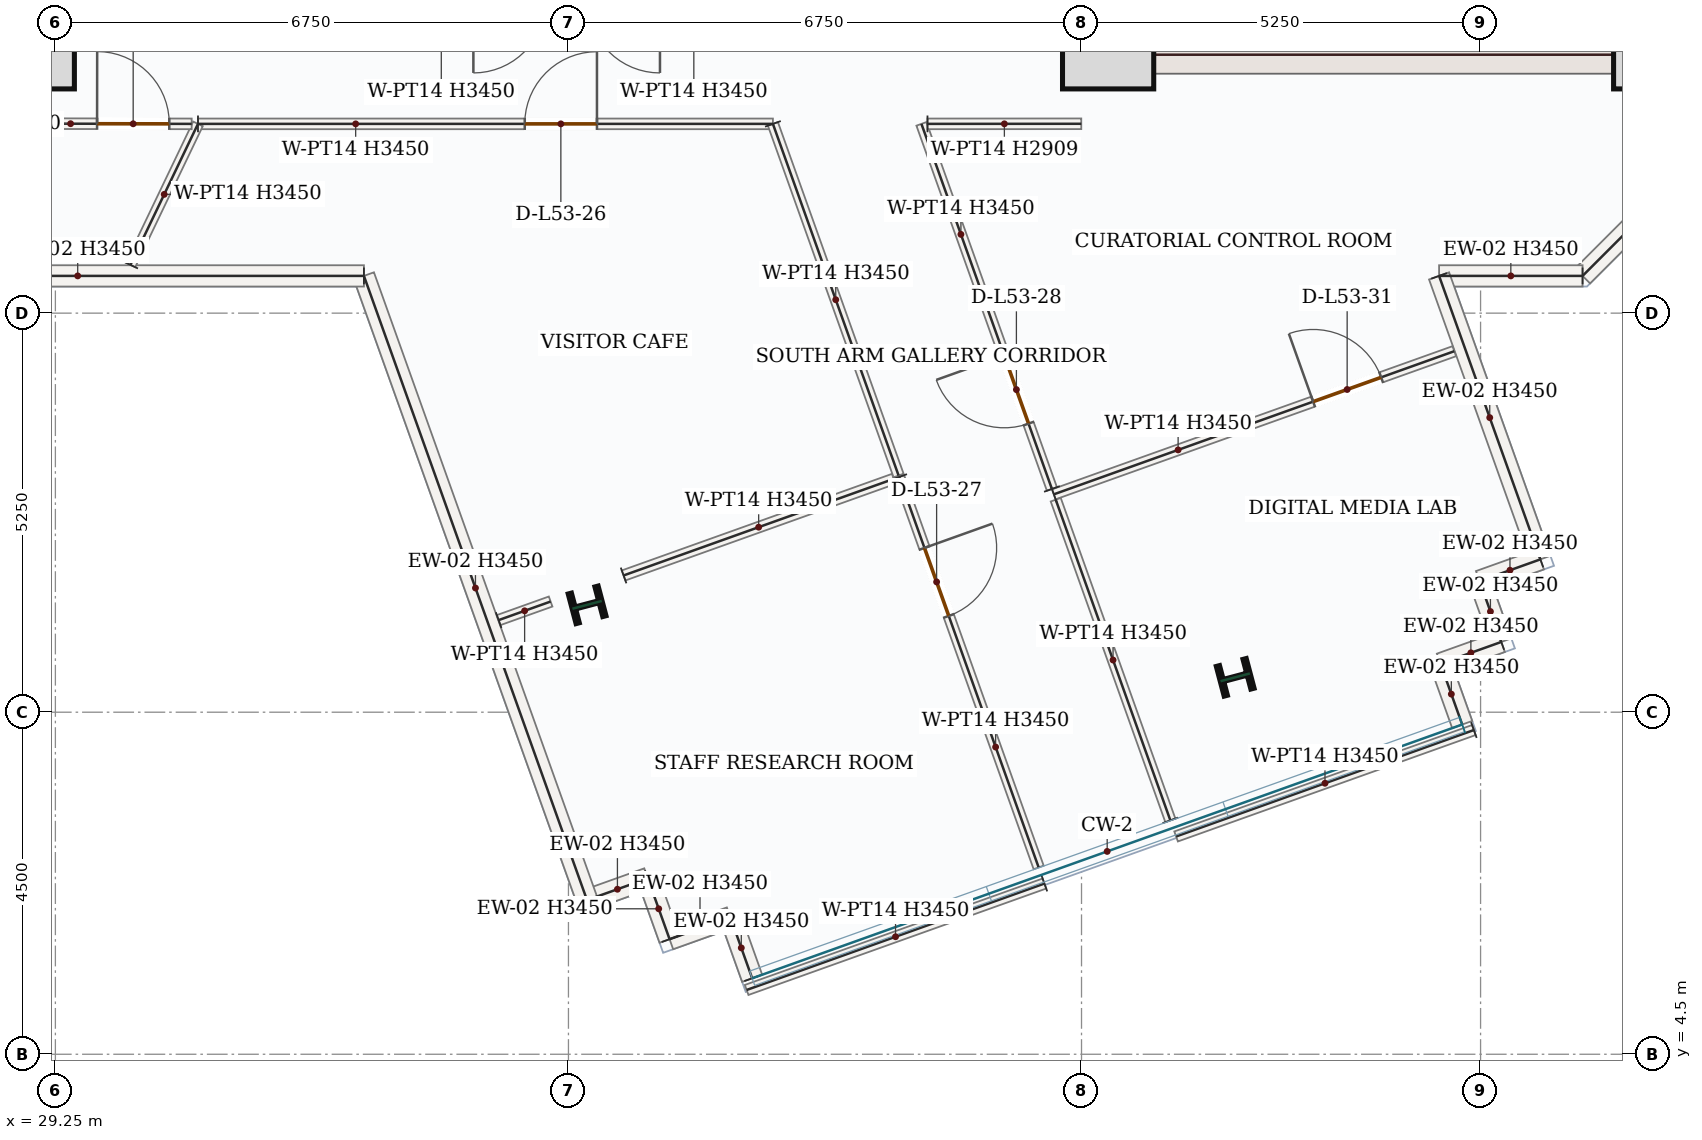
"""IFC4 building model, lengths in metres.
Left out: names, types, materials, properties, quantities, classifications, styles, units other than length and angle.
Written with IfcOpenShell. Run it as: python <this file> out.ifc"""

import sys

from ifc_helpers import new_model, si_unit, direction, frame, frame_2d, origin, origin_2d, place, context, subcontext, project, spatial, rectangle, i_section, extrude, source, transform, mapped, element, fill, save


model = new_model("IFC4")
c1 = context("Model", 3, precision=1e-05, world=origin(), true_north=direction((0.0, 1.0)))
c2 = subcontext(c1, "Body", "Model", "MODEL_VIEW")
j1 = project(units=[si_unit("LENGTHUNIT", "METRE"), si_unit("PLANEANGLEUNIT", "RADIAN")], contexts=[c1])
p1 = place(None, origin())
s1 = spatial("IfcSite", under=j1, at=p1, CompositionType="ELEMENT")
p2 = place(p1, origin())
s2 = spatial("IfcBuilding", under=s1, at=p2, CompositionType="ELEMENT")
p3 = place(p2, frame((0.0, 0.0, 225.3)))
s3 = spatial("IfcBuildingStorey", under=s2, at=p3, CompositionType="ELEMENT", Elevation=225.3)
p4 = place(p3, frame((29.0, 17.4, 0.0), z_axis=(0.0, 0.0, 1.0), x_axis=(0.0, 1.0, 0.0)))
e1 = element("IfcWall", 1, at=p4, inside=s3, PredefinedType="SHEAR", context=c2, shape_type="SweptSolid", body=[
    extrude(rectangle(XDim=8.55, YDim=0.5, at=frame_2d((4.275, 0.0))), origin(), (0.0, 0.0, 1.0), 3.45),
])
p5 = place(p4, frame((6.65, 0.0, 0.0)))
e2 = element("IfcOpeningElement", 2, at=p5, cuts=e1, PredefinedType="OPENING", context=c2, shape_type="SweptSolid", body=[
    extrude(rectangle(XDim=1.1, YDim=2.2, at=frame_2d((0.55, 1.1))), frame((0.0, 0.26, 0.0), z_axis=(0.0, -1.0, 0.0), x_axis=(1.0, 0.0, 0.0)), (0.0, 0.0, 1.0), 0.52),
])
p6 = place(p4, frame((2.15, 0.0, 0.0)))
e3 = element("IfcOpeningElement", 3, at=p6, cuts=e1, PredefinedType="OPENING", context=c2, shape_type="SweptSolid", body=[
    extrude(rectangle(XDim=0.88, YDim=2.1, at=frame_2d((0.44, 1.05))), frame((0.0, 0.26, 0.0), z_axis=(0.0, -1.0, 0.0), x_axis=(1.0, 0.0, 0.0)), (0.0, 0.0, 1.0), 0.52),
])
p7 = place(p4, frame((4.25, 0.0, 0.0)))
e4 = element("IfcOpeningElement", 4, at=p7, cuts=e1, PredefinedType="OPENING", context=c2, shape_type="SweptSolid", body=[
    extrude(rectangle(XDim=0.88, YDim=2.1, at=frame_2d((0.44, 1.05))), frame((0.0, 0.26, 0.0), z_axis=(0.0, -1.0, 0.0), x_axis=(1.0, 0.0, 0.0)), (0.0, 0.0, 1.0), 0.52),
])
p8 = place(p3, frame((43.0, 17.4, 0.0), z_axis=(0.0, 0.0, 1.0), x_axis=(0.0, 1.0, 0.0)))
e5 = element("IfcWall", 5, at=p8, inside=s3, PredefinedType="SHEAR", context=c2, shape_type="SweptSolid", body=[
    extrude(rectangle(XDim=8.55, YDim=0.5, at=frame_2d((4.275, 0.0))), origin(), (0.0, 0.0, 1.0), 3.45),
])
p9 = place(p8, frame((6.65, 0.0, 0.0)))
e6 = element("IfcOpeningElement", 6, at=p9, cuts=e5, PredefinedType="OPENING", context=c2, shape_type="SweptSolid", body=[
    extrude(rectangle(XDim=1.1, YDim=2.2, at=frame_2d((0.55, 1.1))), frame((0.0, 0.26, 0.0), z_axis=(0.0, -1.0, 0.0), x_axis=(1.0, 0.0, 0.0)), (0.0, 0.0, 1.0), 0.52),
])
p10 = place(p8, frame((1.75, 0.0, 0.0)))
e7 = element("IfcOpeningElement", 7, at=p10, cuts=e5, PredefinedType="OPENING", context=c2, shape_type="SweptSolid", body=[
    extrude(rectangle(XDim=1.3, YDim=2.2, at=frame_2d((0.65, 1.1))), frame((0.0, 0.26, 0.0), z_axis=(0.0, -1.0, 0.0), x_axis=(1.0, 0.0, 0.0)), (0.0, 0.0, 1.0), 0.52),
])
p11 = place(p8, frame((4.55, 0.0, 0.0)))
e8 = element("IfcOpeningElement", 8, at=p11, cuts=e5, PredefinedType="OPENING", context=c2, shape_type="SweptSolid", body=[
    extrude(rectangle(XDim=0.88, YDim=2.1, at=frame_2d((0.44, 1.05))), frame((0.0, 0.26, 0.0), z_axis=(0.0, -1.0, 0.0), x_axis=(1.0, 0.0, 0.0)), (0.0, 0.0, 1.0), 0.52),
])
m1 = source(origin(), c2, "Body", "SweptSolid", [
    extrude(rectangle(XDim=7.0, YDim=0.5, at=frame_2d((3.5, 0.0))), origin(), (0.0, 0.0, 1.0), 3.45),
])
p12 = place(p3, frame((43.25, 17.65, 0.0), z_axis=(0.0, 0.0, 1.0), x_axis=(1.0, 0.0, 0.0)))
e9 = element("IfcWall", 9, at=p12, inside=s3, PredefinedType="SHEAR", context=c2, shape_type="MappedRepresentation", body=[
    mapped(m1, transform((0.0, 0.0, 0.0), x_axis=(1.0, 0.0, 0.0), y_axis=(0.0, 1.0, 0.0), z_axis=(0.0, 0.0, 1.0), scale=1.0)),
])
m2 = source(origin(), c2, "Body", "SweptSolid", [
    extrude(rectangle(XDim=1.2, YDim=1.2, at=origin_2d()), origin(), (0.0, 0.0, 1.0), 3.9),
])
for number, where, z_axis, x_axis in (
    (10, (28.9, 17.8, 0.0), (0.0, 0.0, 1.0), (1.0, 0.0, 0.0)),
    (11, (43.1, 17.8, 0.0), (0.0, 0.0, 1.0), (1.0, 0.0, 0.0)),
    (12, (50.35, 17.8, 0.0), (0.0, 0.0, 1.0), (1.0, 0.0, 0.0)),
):
    element("IfcColumn", number, at=place(p3, frame(where, z_axis=z_axis, x_axis=x_axis)), inside=s3, PredefinedType="COLUMN", context=c2, shape_type="MappedRepresentation", body=[
        mapped(m2, transform((0.0, 0.0, 0.0), x_axis=(1.0, 0.0, 0.0), y_axis=(0.0, 1.0, 0.0), z_axis=(0.0, 0.0, 1.0), scale=1.0)),
    ])
m3 = source(origin(), c2, "Body", "SweptSolid", [
    extrude(i_section(OverallWidth=0.404, OverallDepth=0.407, WebThickness=0.027, FlangeThickness=0.044, FilletRadius=0.018, at=origin_2d()), origin(), (0.0, 0.0, 1.0), 3.9),
])
for number, where, z_axis, x_axis in (
    (13, (36.245, 10.412, 0.0), (0.0, 0.0, 1.0), (-0.255, 0.967, 0.0)),
    (14, (44.772, 9.459, 0.0), (0.0, 0.0, 1.0), (-0.255, 0.967, 0.0)),
):
    element("IfcColumn", number, at=place(p3, frame(where, z_axis=z_axis, x_axis=x_axis)), inside=s3, PredefinedType="COLUMN", context=c2, shape_type="MappedRepresentation", body=[
        mapped(m3, transform((0.0, 0.0, 0.0), x_axis=(1.0, 0.0, 0.0), y_axis=(0.0, 1.0, 0.0), z_axis=(0.0, 0.0, 1.0), scale=1.0)),
    ])
m4 = source(origin(), c2, "Body", "SweptSolid", [
    extrude(rectangle(XDim=5.258, YDim=0.28, at=frame_2d((2.629, 0.0))), origin(), (0.0, 0.0, 1.0), 3.45),
])
p13 = place(p3, frame((53.06, 18.458, 0.0), z_axis=(0.0, 0.0, 1.0), x_axis=(-0.707106781187, -0.707106781187, 0.0)))
e15 = element("IfcWall", 15, at=p13, inside=s3, PredefinedType="SOLIDWALL", context=c2, shape_type="MappedRepresentation", body=[
    mapped(m4, transform((0.0, 0.0, 0.0), x_axis=(1.0, 0.0, 0.0), y_axis=(0.0, 1.0, 0.0), z_axis=(0.0, 0.0, 1.0), scale=1.0)),
])
m5 = source(origin(), c2, "Body", "SweptSolid", [
    extrude(rectangle(XDim=1.888, YDim=0.28, at=frame_2d((0.944, 0.0))), origin(), (0.0, 0.0, 1.0), 3.45),
])
p14 = place(p3, frame((49.342, 14.74, 0.0), z_axis=(0.0, 0.0, 1.0), x_axis=(-1.0, 0.0, 0.0)))
e16 = element("IfcWall", 16, at=p14, inside=s3, PredefinedType="SOLIDWALL", context=c2, shape_type="MappedRepresentation", body=[
    mapped(m5, transform((0.0, 0.0, 0.0), x_axis=(1.0, 0.0, 0.0), y_axis=(0.0, 1.0, 0.0), z_axis=(0.0, 0.0, 1.0), scale=1.0)),
])
m6 = source(origin(), c2, "Body", "SweptSolid", [
    extrude(rectangle(XDim=3.96, YDim=0.28, at=frame_2d((1.98, 0.0))), origin(), (0.0, 0.0, 1.0), 3.45),
])
p15 = place(p3, frame((47.454, 14.74, 0.0), z_axis=(0.0, 0.0, 1.0), x_axis=(0.336590223561, -0.941651220677, 0.0)))
e17 = element("IfcWall", 17, at=p15, inside=s3, PredefinedType="SOLIDWALL", context=c2, shape_type="MappedRepresentation", body=[
    mapped(m6, transform((0.0, 0.0, 0.0), x_axis=(1.0, 0.0, 0.0), y_axis=(0.0, 1.0, 0.0), z_axis=(0.0, 0.0, 1.0), scale=1.0)),
])
m7 = source(origin(), c2, "Body", "SweptSolid", [
    extrude(rectangle(XDim=0.85, YDim=0.28, at=frame_2d((0.425, 0.0))), origin(), (0.0, 0.0, 1.0), 3.45),
])
p16 = place(p3, frame((48.787, 11.011, 0.0), z_axis=(0.0, 0.0, 1.0), x_axis=(-0.941657417713, -0.336572886112, 0.0)))
e18 = element("IfcWall", 18, at=p16, inside=s3, PredefinedType="SOLIDWALL", context=c2, shape_type="MappedRepresentation", body=[
    mapped(m7, transform((0.0, 0.0, 0.0), x_axis=(1.0, 0.0, 0.0), y_axis=(0.0, 1.0, 0.0), z_axis=(0.0, 0.0, 1.0), scale=1.0)),
])
m8 = source(origin(), c2, "Body", "SweptSolid", [
    extrude(rectangle(XDim=0.85, YDim=0.28, at=frame_2d((0.425, 0.0))), origin(), (0.0, 0.0, 1.0), 3.45),
])
for number, where, z_axis, x_axis in (
    (19, (47.987, 10.725, 0.0), (0.0, 0.0, 1.0), (0.337, -0.942, 0.0)),
    (20, (48.273, 9.924, 0.0), (0.0, 0.0, 1.0), (-0.942, -0.337, 0.0)),
    (21, (47.472, 9.638, 0.0), (0.0, 0.0, 1.0), (0.336, -0.942, 0.0)),
):
    element("IfcWall", number, at=place(p3, frame(where, z_axis=z_axis, x_axis=x_axis)), inside=s3, PredefinedType="SOLIDWALL", context=c2, shape_type="MappedRepresentation", body=[
        mapped(m8, transform((0.0, 0.0, 0.0), x_axis=(1.0, 0.0, 0.0), y_axis=(0.0, 1.0, 0.0), z_axis=(0.0, 0.0, 1.0), scale=1.0)),
    ])
for number, where, z_axis, x_axis in (
    (22, (38.417, 5.499, 0.0), (0.0, 0.0, 1.0), (-0.336, 0.942, 0.0)),
    (23, (38.131, 6.3, 0.0), (0.0, 0.0, 1.0), (-0.942, -0.337, 0.0)),
):
    element("IfcWall", number, at=place(p3, frame(where, z_axis=z_axis, x_axis=x_axis)), inside=s3, PredefinedType="SOLIDWALL", context=c2, shape_type="MappedRepresentation", body=[
        mapped(m7, transform((0.0, 0.0, 0.0), x_axis=(1.0, 0.0, 0.0), y_axis=(0.0, 1.0, 0.0), z_axis=(0.0, 0.0, 1.0), scale=1.0)),
    ])
for number, where, z_axis, x_axis in (
    (24, (37.331, 6.014, 0.0), (0.0, 0.0, 1.0), (-0.337, 0.942, 0.0)),
    (25, (37.044, 6.814, 0.0), (0.0, 0.0, 1.0), (-0.942, -0.337, 0.0)),
):
    element("IfcWall", number, at=place(p3, frame(where, z_axis=z_axis, x_axis=x_axis)), inside=s3, PredefinedType="SOLIDWALL", context=c2, shape_type="MappedRepresentation", body=[
        mapped(m8, transform((0.0, 0.0, 0.0), x_axis=(1.0, 0.0, 0.0), y_axis=(0.0, 1.0, 0.0), z_axis=(0.0, 0.0, 1.0), scale=1.0)),
    ])
m9 = source(origin(), c2, "Body", "SweptSolid", [
    extrude(rectangle(XDim=8.721, YDim=0.28, at=frame_2d((4.36, 0.0))), origin(), (0.0, 0.0, 1.0), 3.45),
])
p17 = place(p3, frame((36.244, 6.528, 0.0), z_axis=(0.0, 0.0, 1.0), x_axis=(-0.336554520074, 0.941663982011, 0.0)))
e26 = element("IfcWall", 26, at=p17, inside=s3, PredefinedType="SOLIDWALL", context=c2, shape_type="MappedRepresentation", body=[
    mapped(m9, transform((0.0, 0.0, 0.0), x_axis=(1.0, 0.0, 0.0), y_axis=(0.0, 1.0, 0.0), z_axis=(0.0, 0.0, 1.0), scale=1.0)),
])
p18 = place(p3, frame((33.309, 14.74, 0.0), z_axis=(0.0, 0.0, 1.0), x_axis=(-1.0, 0.0, 0.0)))
e27 = element("IfcWall", 27, at=p18, inside=s3, PredefinedType="SOLIDWALL", context=c2, shape_type="SweptSolid", body=[
    extrude(rectangle(XDim=10.651, YDim=0.28, at=frame_2d((5.326, 0.0))), origin(), (0.0, 0.0, 1.0), 3.45),
])
p19 = place(p18, frame((7.681, 0.0, 0.0)))
e28 = element("IfcOpeningElement", 28, at=p19, cuts=e27, PredefinedType="OPENING", context=c2, shape_type="SweptSolid", body=[
    extrude(rectangle(XDim=1.05, YDim=2.15, at=frame_2d((0.525, 1.075))), frame((0.0, 0.15, 0.0), z_axis=(0.0, -1.0, 0.0), x_axis=(1.0, 0.0, 0.0)), (0.0, 0.0, 1.0), 0.3),
])
p20 = place(p3, frame((42.386, 11.866, 0.0), z_axis=(0.0, 0.0, 1.0), x_axis=(0.94166093099, 0.336563056568, 0.0)))
e29 = element("IfcWall", 29, at=p20, inside=s3, PredefinedType="PARTITIONING", context=c2, shape_type="SweptSolid", body=[
    extrude(rectangle(XDim=5.595, YDim=0.14, at=frame_2d((2.797, 0.0))), origin(), (0.0, 0.0, 1.0), 3.45),
])
p21 = place(p20, frame((3.623, 0.0, 0.0)))
e30 = element("IfcOpeningElement", 30, at=p21, cuts=e29, PredefinedType="OPENING", context=c2, shape_type="SweptSolid", body=[
    extrude(rectangle(XDim=0.95, YDim=2.15, at=frame_2d((0.475, 1.075))), frame((0.0, 0.08, 0.0), z_axis=(0.0, -1.0, 0.0), x_axis=(1.0, 0.0, 0.0)), (0.0, 0.0, 1.0), 0.16),
])
m10 = source(origin(), c2, "Body", "SweptSolid", [
    extrude(rectangle(XDim=4.16, YDim=0.14, at=frame_2d((2.08, 0.0))), origin(), (0.0, 0.0, 1.0), 3.45),
])
p22 = place(p3, frame((47.912, 8.765, 0.0), z_axis=(0.0, 0.0, 1.0), x_axis=(-0.94167417377, -0.336526002642, 0.0)))
e31 = element("IfcWall", 31, at=p22, inside=s3, PredefinedType="PARTITIONING", context=c2, shape_type="MappedRepresentation", body=[
    mapped(m10, transform((0.0, 0.0, 0.0), x_axis=(1.0, 0.0, 0.0), y_axis=(0.0, 1.0, 0.0), z_axis=(0.0, 0.0, 1.0), scale=1.0)),
])
m11 = source(origin(), c2, "Body", "SweptSolid", [
    extrude(rectangle(XDim=4.48, YDim=0.14, at=frame_2d((2.24, 0.0))), origin(), (0.0, 0.0, 1.0), 3.45),
])
p23 = place(p3, frame((43.919, 7.577, 0.0), z_axis=(0.0, 0.0, 1.0), x_axis=(-0.336557324255, 0.941662979781, 0.0)))
e32 = element("IfcWall", 32, at=p23, inside=s3, PredefinedType="PARTITIONING", context=c2, shape_type="MappedRepresentation", body=[
    mapped(m11, transform((0.0, 0.0, 0.0), x_axis=(1.0, 0.0, 0.0), y_axis=(0.0, 1.0, 0.0), z_axis=(0.0, 0.0, 1.0), scale=1.0)),
])
p24 = place(p3, frame((40.35, 12.094, 0.0), z_axis=(0.0, 0.0, 1.0), x_axis=(0.336563203689, -0.941660878407, 0.0)))
e33 = element("IfcWall", 33, at=p24, inside=s3, PredefinedType="PARTITIONING", context=c2, shape_type="SweptSolid", body=[
    extrude(rectangle(XDim=5.455, YDim=0.14, at=frame_2d((2.728, 0.0))), origin(), (0.0, 0.0, 1.0), 3.45),
])
p25 = place(p24, frame((0.991, 0.0, 0.0)))
e34 = element("IfcOpeningElement", 34, at=p25, cuts=e33, PredefinedType="OPENING", context=c2, shape_type="SweptSolid", body=[
    extrude(rectangle(XDim=0.95, YDim=2.15, at=frame_2d((0.475, 1.075))), frame((0.0, 0.08, 0.0), z_axis=(0.0, -1.0, 0.0), x_axis=(1.0, 0.0, 0.0)), (0.0, 0.0, 1.0), 0.16),
])
p26 = place(p3, frame((42.262, 6.746, 0.0), z_axis=(0.0, 0.0, 1.0), x_axis=(-0.94167417377, -0.336526002642, 0.0)))
e35 = element("IfcWall", 35, at=p26, inside=s3, PredefinedType="PARTITIONING", context=c2, shape_type="MappedRepresentation", body=[
    mapped(m10, transform((0.0, 0.0, 0.0), x_axis=(1.0, 0.0, 0.0), y_axis=(0.0, 1.0, 0.0), z_axis=(0.0, 0.0, 1.0), scale=1.0)),
])
m12 = source(origin(), c2, "Body", "SweptSolid", [
    extrude(rectangle(XDim=0.726, YDim=0.14, at=frame_2d((0.363, 0.0))), origin(), (0.0, 0.0, 1.0), 3.45),
])
p27 = place(p3, frame((35.082, 10.212, 0.0), z_axis=(0.0, 0.0, 1.0), x_axis=(0.941779940629, 0.33622989669, 0.0)))
e36 = element("IfcWall", 36, at=p27, inside=s3, PredefinedType="PARTITIONING", context=c2, shape_type="MappedRepresentation", body=[
    mapped(m12, transform((0.0, 0.0, 0.0), x_axis=(1.0, 0.0, 0.0), y_axis=(0.0, 1.0, 0.0), z_axis=(0.0, 0.0, 1.0), scale=1.0)),
])
m13 = source(origin(), c2, "Body", "SweptSolid", [
    extrude(rectangle(XDim=3.774, YDim=0.14, at=frame_2d((1.887, 0.0))), origin(), (0.0, 0.0, 1.0), 3.45),
])
p28 = place(p3, frame((36.725, 10.799, 0.0), z_axis=(0.0, 0.0, 1.0), x_axis=(0.94166578898, 0.336549464216, 0.0)))
e37 = element("IfcWall", 37, at=p28, inside=s3, PredefinedType="PARTITIONING", context=c2, shape_type="MappedRepresentation", body=[
    mapped(m13, transform((0.0, 0.0, 0.0), x_axis=(1.0, 0.0, 0.0), y_axis=(0.0, 1.0, 0.0), z_axis=(0.0, 0.0, 1.0), scale=1.0)),
])
p29 = place(p3, frame((31.126, 16.74, 0.0), z_axis=(0.0, 0.0, 1.0), x_axis=(1.0, 0.0, 0.0)))
e38 = element("IfcWall", 38, at=p29, inside=s3, PredefinedType="PARTITIONING", context=c2, shape_type="SweptSolid", body=[
    extrude(rectangle(XDim=7.564, YDim=0.14, at=frame_2d((3.782, 0.0))), origin(), (0.0, 0.0, 1.0), 3.45),
])
p30 = place(p29, frame((4.299, 0.0, 0.0)))
e39 = element("IfcOpeningElement", 39, at=p30, cuts=e38, PredefinedType="OPENING", context=c2, shape_type="SweptSolid", body=[
    extrude(rectangle(XDim=0.95, YDim=2.15, at=frame_2d((0.475, 1.075))), frame((0.0, 0.08, 0.0), z_axis=(0.0, -1.0, 0.0), x_axis=(1.0, 0.0, 0.0)), (0.0, 0.0, 1.0), 0.16),
])
m14 = source(origin(), c2, "Body", "SweptSolid", [
    extrude(rectangle(XDim=4.913, YDim=0.14, at=frame_2d((2.457, 0.0))), origin(), (0.0, 0.0, 1.0), 3.45),
])
p31 = place(p3, frame((38.69, 16.74, 0.0), z_axis=(0.0, 0.0, 1.0), x_axis=(0.336547288081, -0.941666566724, 0.0)))
e40 = element("IfcWall", 40, at=p31, inside=s3, PredefinedType="PARTITIONING", context=c2, shape_type="MappedRepresentation", body=[
    mapped(m14, transform((0.0, 0.0, 0.0), x_axis=(1.0, 0.0, 0.0), y_axis=(0.0, 1.0, 0.0), z_axis=(0.0, 0.0, 1.0), scale=1.0)),
])
m15 = source(origin(), c2, "Body", "SweptSolid", [
    extrude(rectangle(XDim=2.057, YDim=0.14, at=frame_2d((1.028, 0.0))), origin(), (0.0, 0.0, 1.0), 3.45),
])
p32 = place(p3, frame((30.237, 14.885, 0.0), z_axis=(0.0, 0.0, 1.0), x_axis=(0.43214833388, 0.90180253799, 0.0)))
e41 = element("IfcWall", 41, at=p32, inside=s3, PredefinedType="PARTITIONING", context=c2, shape_type="MappedRepresentation", body=[
    mapped(m15, transform((0.0, 0.0, 0.0), x_axis=(1.0, 0.0, 0.0), y_axis=(0.0, 1.0, 0.0), z_axis=(0.0, 0.0, 1.0), scale=1.0)),
])
p33 = place(p3, frame((42.361, 11.937, 0.0), z_axis=(0.0, 0.0, 1.0), x_axis=(-0.336588056289, 0.941651995359, 0.0)))
e42 = element("IfcWall", 42, at=p33, inside=s3, PredefinedType="PARTITIONING", context=c2, shape_type="SweptSolid", body=[
    extrude(rectangle(XDim=5.101, YDim=0.14, at=frame_2d((2.55, 0.0))), origin(), (0.0, 0.0, 1.0), 3.45),
])
p34 = place(p33, frame((0.913, 0.0, 0.0)))
e43 = element("IfcOpeningElement", 43, at=p34, cuts=e42, PredefinedType="OPENING", context=c2, shape_type="SweptSolid", body=[
    extrude(rectangle(XDim=0.95, YDim=2.15, at=frame_2d((0.475, 1.075))), frame((0.0, 0.08, 0.0), z_axis=(0.0, -1.0, 0.0), x_axis=(1.0, 0.0, 0.0)), (0.0, 0.0, 1.0), 0.16),
])
m16 = source(origin(), c2, "Body", "SweptSolid", [
    extrude(rectangle(XDim=2.023, YDim=0.14, at=frame_2d((1.012, 0.0))), origin(), (0.0, 0.0, 1.0), 2.909),
])
p35 = place(p3, frame((40.723, 16.74, 0.0), z_axis=(0.0, 0.0, 1.0), x_axis=(0.999999817982, 0.000603354542, 0.0)))
e44 = element("IfcWall", 44, at=p35, inside=s3, PredefinedType="PARTITIONING", context=c2, shape_type="MappedRepresentation", body=[
    mapped(m16, transform((0.0, 0.0, 0.0), x_axis=(1.0, 0.0, 0.0), y_axis=(0.0, 1.0, 0.0), z_axis=(0.0, 0.0, 1.0), scale=1.0)),
])
p36 = place(p3, frame((29.252, 16.743, 0.0), z_axis=(0.0, 0.0, 1.0), x_axis=(0.999998876126, -0.00149924869, 0.0)))
e45 = element("IfcWall", 45, at=p36, inside=s3, PredefinedType="PARTITIONING", context=c2, shape_type="SweptSolid", body=[
    extrude(rectangle(XDim=1.791, YDim=0.14, at=frame_2d((0.896, 0.0))), origin(), (0.0, 0.0, 1.0), 3.45),
])
p37 = place(p36, frame((0.547, 0.0, 0.0)))
e46 = element("IfcOpeningElement", 46, at=p37, cuts=e45, PredefinedType="OPENING", context=c2, shape_type="SweptSolid", body=[
    extrude(rectangle(XDim=0.95, YDim=2.15, at=frame_2d((0.475, 1.075))), frame((0.0, 0.08, 0.0), z_axis=(0.0, -1.0, 0.0), x_axis=(1.0, 0.0, 0.0)), (0.0, 0.0, 1.0), 0.16),
])
m17 = source(origin(), c2, "Body", "SweptSolid", [
    extrude(rectangle(XDim=0.95, YDim=2.15, at=frame_2d((0.475, 1.075))), frame((0.0, 0.025, 0.0), z_axis=(0.0, -1.0, 0.0), x_axis=(1.0, 0.0, 0.0)), (0.0, 0.0, 1.0), 0.05),
])
p38 = place(p37, origin())
e47 = element("IfcDoor", 47, at=p38, inside=s3, OperationType="SINGLE_SWING_LEFT", PredefinedType="DOOR", context=c2, shape_type="MappedRepresentation", body=[
    mapped(m17, transform((0.0, 0.0, 0.0), x_axis=(1.0, 0.0, 0.0), y_axis=(0.0, 1.0, 0.0), z_axis=(0.0, 0.0, 1.0), scale=1.0)),
])
fill(e46, e47)
p39 = place(p30, origin())
e48 = element("IfcDoor", 48, at=p39, inside=s3, OperationType="SINGLE_SWING_RIGHT", PredefinedType="DOOR", context=c2, shape_type="MappedRepresentation", body=[
    mapped(m17, transform((0.0, 0.0, 0.0), x_axis=(1.0, 0.0, 0.0), y_axis=(0.0, 1.0, 0.0), z_axis=(0.0, 0.0, 1.0), scale=1.0)),
])
fill(e39, e48)
p40 = place(p25, origin())
e49 = element("IfcDoor", 49, at=p40, inside=s3, OperationType="SINGLE_SWING_LEFT", PredefinedType="DOOR", context=c2, shape_type="MappedRepresentation", body=[
    mapped(m17, transform((0.0, 0.0, 0.0), x_axis=(1.0, 0.0, 0.0), y_axis=(0.0, 1.0, 0.0), z_axis=(0.0, 0.0, 1.0), scale=1.0)),
])
fill(e34, e49)
p41 = place(p34, origin())
e50 = element("IfcDoor", 50, at=p41, inside=s3, OperationType="SINGLE_SWING_RIGHT", PredefinedType="DOOR", context=c2, shape_type="MappedRepresentation", body=[
    mapped(m17, transform((0.0, 0.0, 0.0), x_axis=(1.0, 0.0, 0.0), y_axis=(0.0, 1.0, 0.0), z_axis=(0.0, 0.0, 1.0), scale=1.0)),
])
fill(e43, e50)
p42 = place(p21, origin())
e51 = element("IfcDoor", 51, at=p42, inside=s3, OperationType="SINGLE_SWING_LEFT", PredefinedType="DOOR", context=c2, shape_type="MappedRepresentation", body=[
    mapped(m17, transform((0.0, 0.0, 0.0), x_axis=(1.0, 0.0, 0.0), y_axis=(0.0, 1.0, 0.0), z_axis=(0.0, 0.0, 1.0), scale=1.0)),
])
fill(e30, e51)
save(model, sys.argv[1])
